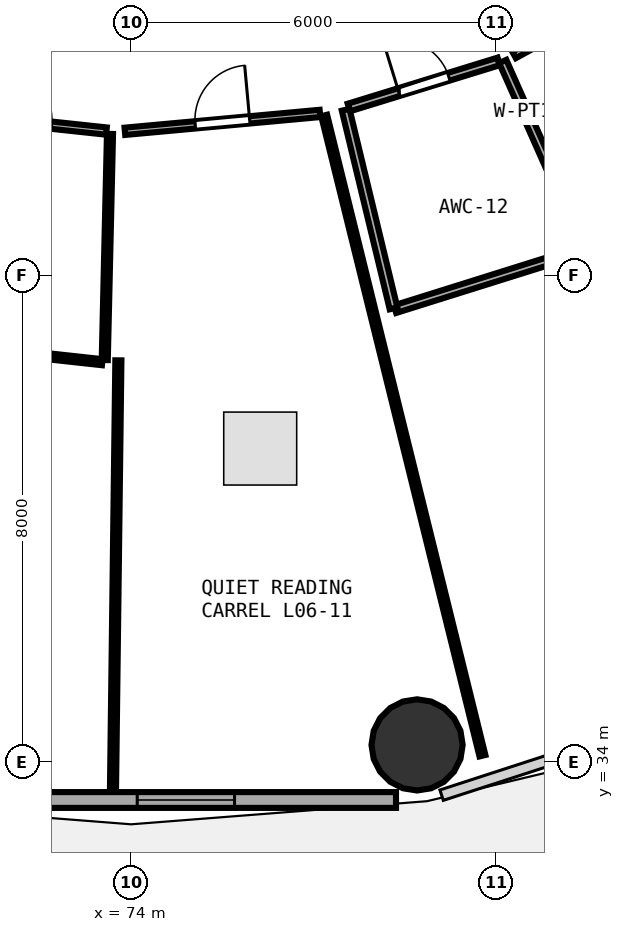
"""IFC4 building model, lengths in metres.
Left out: names, types, materials, properties, quantities, classifications, styles, units other than length and angle.
Written with IfcOpenShell. Run it as: python <this file> out.ifc"""

import sys

from ifc_helpers import new_model, si_unit, direction, frame, frame_2d, origin, origin_2d, place, context, subcontext, project, spatial, rectangle, circle, extrude, element, fill, save


model = new_model("IFC4")
c1 = context("Model", 3, precision=1e-05, world=origin(), true_north=direction((0.0, 1.0)))
c2 = subcontext(c1, "Body", "Model", "MODEL_VIEW")
j1 = project(units=[si_unit("LENGTHUNIT", "METRE"), si_unit("PLANEANGLEUNIT", "RADIAN")], contexts=[c1])
p1 = place(None, origin())
s1 = spatial("IfcSite", under=j1, at=p1, CompositionType="ELEMENT")
p2 = place(p1, origin())
s2 = spatial("IfcBuilding", under=s1, at=p2, CompositionType="ELEMENT")
p3 = place(p2, frame((0.0, 0.0, 26.25)))
s3 = spatial("IfcBuildingStorey", under=s2, at=p3, CompositionType="ELEMENT", Elevation=26.25)
p4 = place(p3, frame((78.702, 34.286, 0.0), z_axis=(0.0, 0.0, 1.0), x_axis=(1.0, 0.0, 0.0)))
e1 = element("IfcColumn", 1, at=p4, inside=s3, PredefinedType="COLUMN", context=c2, shape_type="SweptSolid", body=[
    extrude(circle(Radius=0.75, at=origin_2d()), origin(), (0.0, 0.0, 1.0), 3.75),
])
p5 = place(p3, frame((69.644, 33.38, 0.0), z_axis=(0.0, 0.0, 1.0), x_axis=(1.0, 0.0, 0.0)))
e2 = element("IfcWall", 2, at=p5, inside=s3, PredefinedType="SOLIDWALL", context=c2, shape_type="SweptSolid", body=[
    extrude(rectangle(XDim=8.712, YDim=0.26, at=frame_2d((4.356, 0.0))), origin(), (0.0, 0.0, 1.0), 3.475),
])
p6 = place(p5, frame((4.456, 0.0, 0.85)))
e3 = element("IfcOpeningElement", 3, at=p6, cuts=e2, PredefinedType="OPENING", context=c2, shape_type="SweptSolid", body=[
    extrude(rectangle(XDim=1.6, YDim=1.45, at=frame_2d((0.8, 0.725))), frame((0.0, 0.14, 0.0), z_axis=(0.0, -1.0, 0.0), x_axis=(1.0, 0.0, 0.0)), (0.0, 0.0, 1.0), 0.28),
])
p7 = place(p3, frame((70.895, 44.67, 0.0), z_axis=(0.0, 0.0, 1.0), x_axis=(0.994302004983, -0.106599825921, 0.0)))
e4 = element("IfcWall", 4, at=p7, inside=s3, PredefinedType="PARTITIONING", context=c2, shape_type="SweptSolid", body=[
    extrude(rectangle(XDim=2.714, YDim=0.12, at=frame_2d((1.357, 0.0))), origin(), (0.0, 0.0, 1.0), 3.235),
])
p8 = place(p7, frame((0.907, 0.0, 0.0)))
e5 = element("IfcOpeningElement", 5, at=p8, cuts=e4, PredefinedType="OPENING", context=c2, shape_type="SweptSolid", body=[
    extrude(rectangle(XDim=0.9, YDim=2.08, at=frame_2d((0.45, 1.04))), frame((0.0, 0.07, 0.0), z_axis=(0.0, -1.0, 0.0), x_axis=(1.0, 0.0, 0.0)), (0.0, 0.0, 1.0), 0.14),
])
p9 = place(p3, frame((73.897, 44.376, 0.0), z_axis=(0.0, 0.0, 1.0), x_axis=(0.995829610124, 0.091232601628, 0.0)))
e6 = element("IfcWall", 6, at=p9, inside=s3, PredefinedType="PARTITIONING", context=c2, shape_type="SweptSolid", body=[
    extrude(rectangle(XDim=3.222, YDim=0.12, at=frame_2d((1.611, 0.0))), origin(), (0.0, 0.0, 1.0), 3.235),
])
p10 = place(p9, frame((1.161, 0.0, 0.0)))
e7 = element("IfcOpeningElement", 7, at=p10, cuts=e6, PredefinedType="OPENING", context=c2, shape_type="SweptSolid", body=[
    extrude(rectangle(XDim=0.9, YDim=2.08, at=frame_2d((0.45, 1.04))), frame((0.0, 0.07, 0.0), z_axis=(0.0, -1.0, 0.0), x_axis=(1.0, 0.0, 0.0)), (0.0, 0.0, 1.0), 0.14),
])
p11 = place(p3, frame((77.58, 44.768, 0.0), z_axis=(0.0, 0.0, 1.0), x_axis=(0.955754448098, 0.294165659011, 0.0)))
e8 = element("IfcWall", 8, at=p11, inside=s3, PredefinedType="PLUMBINGWALL", context=c2, shape_type="SweptSolid", body=[
    extrude(rectangle(XDim=2.579, YDim=0.13, at=frame_2d((1.29, 0.0))), origin(), (0.0, 0.0, 1.0), 3.235),
])
p12 = place(p11, frame((0.86, 0.0, 0.0)))
e9 = element("IfcOpeningElement", 9, at=p12, cuts=e8, PredefinedType="OPENING", context=c2, shape_type="SweptSolid", body=[
    extrude(rectangle(XDim=0.86, YDim=2.05, at=frame_2d((0.43, 1.025))), frame((0.0, 0.075, 0.0), z_axis=(0.0, -1.0, 0.0), x_axis=(1.0, 0.0, 0.0)), (0.0, 0.0, 1.0), 0.15),
])
p13 = place(p3, frame((80.299, 45.632, 0.0), z_axis=(0.0, 0.0, 1.0), x_axis=(0.876387079092, 0.481607399861, 0.0)))
e10 = element("IfcWall", 10, at=p13, inside=s3, PredefinedType="PARTITIONING", context=c2, shape_type="SweptSolid", body=[
    extrude(rectangle(XDim=3.281, YDim=0.12, at=frame_2d((1.641, 0.0))), origin(), (0.0, 0.0, 1.0), 2.875),
])
p14 = place(p13, frame((1.191, 0.0, 0.0)))
e11 = element("IfcOpeningElement", 11, at=p14, cuts=e10, PredefinedType="OPENING", context=c2, shape_type="SweptSolid", body=[
    extrude(rectangle(XDim=0.9, YDim=2.08, at=frame_2d((0.45, 1.04))), frame((0.0, 0.07, 0.0), z_axis=(0.0, -1.0, 0.0), x_axis=(1.0, 0.0, 0.0)), (0.0, 0.0, 1.0), 0.14),
])
p15 = place(p3, frame((73.652, 44.334, 0.0), z_axis=(0.0, 0.0, 1.0), x_axis=(-0.02316715399, -0.99973160547, 0.0)))
e12 = element("IfcWall", 12, at=p15, inside=s3, PredefinedType="PARTITIONING", context=c2, shape_type="SweptSolid", body=[
    extrude(rectangle(XDim=3.72, YDim=0.1, at=frame_2d((1.86, 0.0))), origin(), (0.0, 0.0, 1.0), 3.175),
])
p16 = place(p3, frame((73.525, 40.579, 0.0), z_axis=(0.0, 0.0, 1.0), x_axis=(-0.994070147468, 0.108740709544, 0.0)))
e13 = element("IfcWall", 13, at=p16, inside=s3, PredefinedType="PARTITIONING", context=c2, shape_type="SweptSolid", body=[
    extrude(rectangle(XDim=3.471, YDim=0.1, at=frame_2d((1.735, 0.0))), origin(), (0.0, 0.0, 1.0), 3.175),
])
p17 = place(p3, frame((77.175, 44.637, 0.0), z_axis=(0.0, 0.0, 1.0), x_axis=(0.239971369295, -0.970779965759, 0.0)))
e14 = element("IfcWall", 14, at=p17, inside=s3, PredefinedType="PARTITIONING", context=c2, shape_type="SweptSolid", body=[
    extrude(rectangle(XDim=10.846, YDim=0.1, at=frame_2d((5.423, 0.0))), origin(), (0.0, 0.0, 1.0), 2.875),
])
p18 = place(p3, frame((73.701, 33.561, 0.0), z_axis=(0.0, 0.0, 1.0), x_axis=(0.012537113793, 0.9999214073, 0.0)))
e15 = element("IfcWall", 15, at=p18, inside=s3, PredefinedType="PARTITIONING", context=c2, shape_type="SweptSolid", body=[
    extrude(rectangle(XDim=7.049, YDim=0.1, at=frame_2d((3.525, 0.0))), origin(), (0.0, 0.0, 1.0), 2.875),
])
p19 = place(p3, frame((80.111, 45.526, 0.0), z_axis=(0.0, 0.0, 1.0), x_axis=(0.405936178007, -0.913901427608, 0.0)))
e16 = element("IfcWall", 16, at=p19, inside=s3, PredefinedType="PLUMBINGWALL", context=c2, shape_type="SweptSolid", body=[
    extrude(rectangle(XDim=3.36, YDim=0.13, at=frame_2d((1.68, 0.0))), origin(), (0.0, 0.0, 1.0), 2.875),
])
p20 = place(p3, frame((81.464, 42.431, 0.0), z_axis=(0.0, 0.0, 1.0), x_axis=(-0.954175708416, -0.299246917226, 0.0)))
e17 = element("IfcWall", 17, at=p20, inside=s3, PredefinedType="PLUMBINGWALL", context=c2, shape_type="SweptSolid", body=[
    extrude(rectangle(XDim=3.275, YDim=0.13, at=frame_2d((1.637, 0.0))), origin(), (0.0, 0.0, 1.0), 2.875),
])
p21 = place(p3, frame((78.315, 41.464, 0.0), z_axis=(0.0, 0.0, 1.0), x_axis=(-0.234406131581, 0.972138758345, 0.0)))
e18 = element("IfcWall", 18, at=p21, inside=s3, PredefinedType="PLUMBINGWALL", context=c2, shape_type="SweptSolid", body=[
    extrude(rectangle(XDim=3.36, YDim=0.13, at=frame_2d((1.68, 0.0))), origin(), (0.0, 0.0, 1.0), 3.235),
])
p22 = place(p6, origin())
e19 = element("IfcWindow", 19, at=p22, inside=s3, PartitioningType="SINGLE_PANEL", PredefinedType="WINDOW", context=c2, shape_type="SweptSolid", body=[
    extrude(rectangle(XDim=1.6, YDim=1.45, at=frame_2d((0.8, 0.725))), frame((0.0, 0.03, 0.0), z_axis=(0.0, -1.0, 0.0), x_axis=(1.0, 0.0, 0.0)), (0.0, 0.0, 1.0), 0.06),
])
fill(e3, e19)
p23 = place(p10, origin())
e20 = element("IfcDoor", 20, at=p23, inside=s3, OperationType="SINGLE_SWING_RIGHT", PredefinedType="DOOR", context=c2, shape_type="SweptSolid", body=[
    extrude(rectangle(XDim=0.9, YDim=2.08, at=frame_2d((0.45, 1.04))), frame((0.0, 0.025, 0.0), z_axis=(0.0, -1.0, 0.0), x_axis=(1.0, 0.0, 0.0)), (0.0, 0.0, 1.0), 0.05),
])
fill(e7, e20)
p24 = place(p12, origin())
e21 = element("IfcDoor", 21, at=p24, inside=s3, OperationType="SINGLE_SWING_LEFT", PredefinedType="DOOR", context=c2, shape_type="SweptSolid", body=[
    extrude(rectangle(XDim=0.86, YDim=2.05, at=frame_2d((0.43, 1.025))), frame((0.0, 0.025, 0.0), z_axis=(0.0, -1.0, 0.0), x_axis=(1.0, 0.0, 0.0)), (0.0, 0.0, 1.0), 0.05),
])
fill(e9, e21)
save(model, sys.argv[1])
